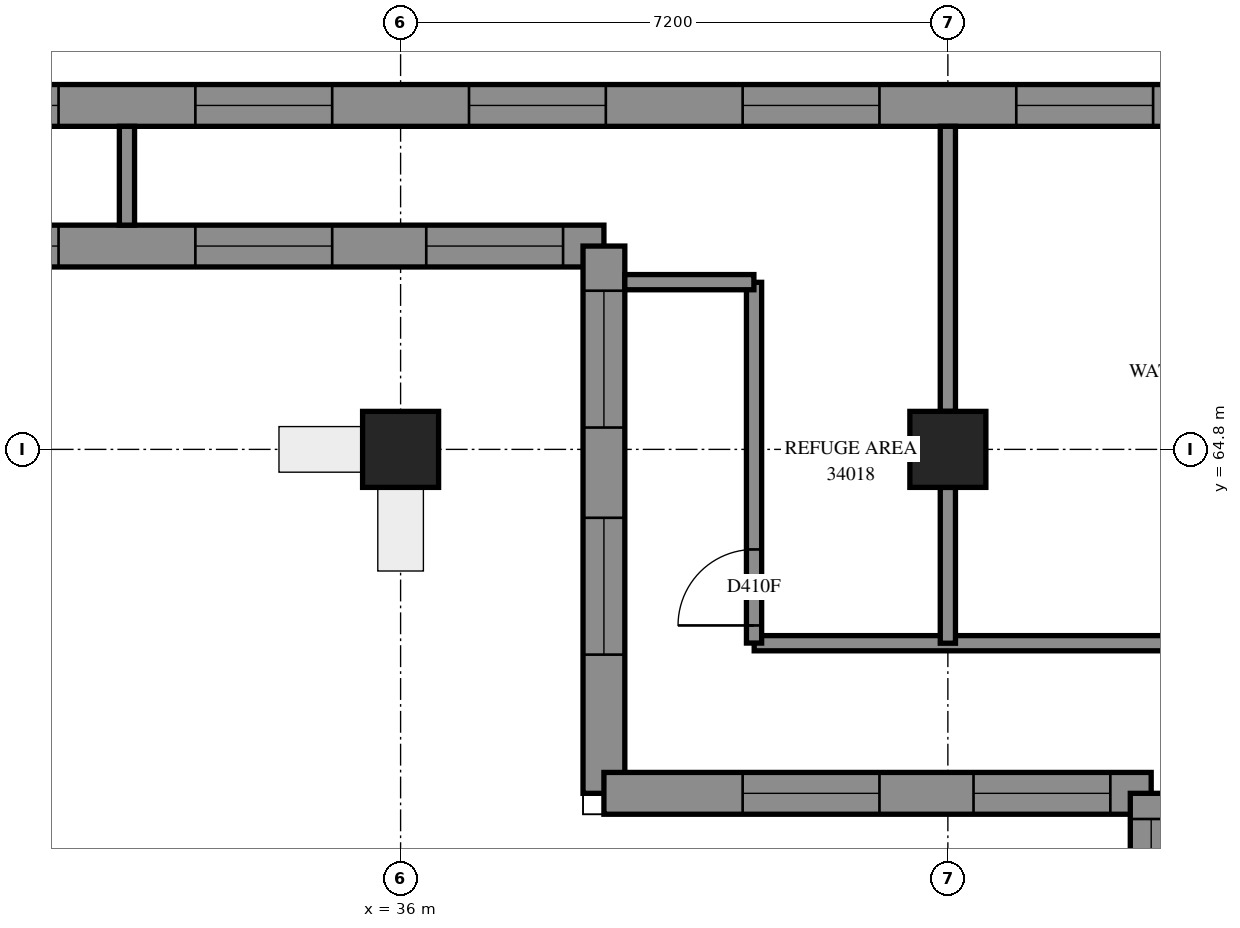
"""IFC4 building model, lengths in metres.
Left out: names, types, materials, properties, quantities, classifications, styles, units other than length and angle.
Written with IfcOpenShell. Run it as: python <this file> out.ifc"""

import sys

from ifc_helpers import new_model, si_unit, direction, frame, frame_2d, origin, origin_2d, place, context, subcontext, project, spatial, polyline, rectangle, outline, extrude, element, fill, save


model = new_model("IFC4")
c1 = context("Model", 3, precision=1e-05, world=origin(), true_north=direction((0.0, 1.0)))
c2 = subcontext(c1, "Body", "Model", "MODEL_VIEW")
j1 = project(units=[si_unit("LENGTHUNIT", "METRE"), si_unit("PLANEANGLEUNIT", "RADIAN")], contexts=[c1])
p1 = place(None, origin())
s1 = spatial("IfcSite", under=j1, at=p1, CompositionType="ELEMENT")
p2 = place(p1, origin())
s2 = spatial("IfcBuilding", under=s1, at=p2, CompositionType="ELEMENT")
p3 = place(p2, frame((0.0, 0.0, 126.2)))
s3 = spatial("IfcBuildingStorey", under=s2, at=p3, CompositionType="ELEMENT", Elevation=126.2)
p4 = place(p3, frame((36.0, 64.8, -0.3), z_axis=(0.0, 0.0, 1.0), x_axis=(1.0, 0.0, 0.0)))
e1 = element("IfcColumn", 1, at=p4, inside=s3, PredefinedType="COLUMN", context=c2, shape_type="SweptSolid", body=[
    extrude(rectangle(XDim=1.0, YDim=1.0, at=origin_2d()), origin(), (0.0, 0.0, 1.0), 5.0),
])
p5 = place(p3, frame((43.2, 64.8, 0.0), z_axis=(0.0, 0.0, 1.0), x_axis=(1.0, 0.0, 0.0)))
e2 = element("IfcColumn", 2, at=p5, inside=s3, PredefinedType="COLUMN", context=c2, shape_type="SweptSolid", body=[
    extrude(rectangle(XDim=1.0, YDim=1.0, at=origin_2d()), origin(), (0.0, 0.0, 1.0), 4.7),
])
p6 = place(p3, frame((78.092, 69.325, 0.0), z_axis=(0.0, 0.0, 1.0), x_axis=(-1.0, 0.0, 0.0)))
e3 = element("IfcWall", 3, at=p6, inside=s3, PredefinedType="SOLIDWALL", context=c2, shape_type="SweptSolid", body=[
    extrude(outline(polyline([(-0.114, -0.275), (54.092, -0.275), (53.542, 0.275), (0.114, 0.275), (-0.114, -0.275)])), origin(), (0.0, 0.0, 1.0), 4.7),
])
p7 = place(p6, frame((0.503, 0.0, 0.9)))
e4 = element("IfcOpeningElement", 4, at=p7, cuts=e3, PredefinedType="OPENING", context=c2, shape_type="SweptSolid", body=[
    extrude(rectangle(XDim=1.8, YDim=2.4, at=frame_2d((0.9, 1.2))), frame((0.0, 0.285, 0.0), z_axis=(0.0, -1.0, 0.0), x_axis=(1.0, 0.0, 0.0)), (0.0, 0.0, 1.0), 0.57),
])
p8 = place(p6, frame((3.392, 0.0, 0.9)))
e5 = element("IfcOpeningElement", 5, at=p8, cuts=e3, PredefinedType="OPENING", context=c2, shape_type="SweptSolid", body=[
    extrude(rectangle(XDim=1.8, YDim=2.4, at=frame_2d((0.9, 1.2))), frame((0.0, 0.285, 0.0), z_axis=(0.0, -1.0, 0.0), x_axis=(1.0, 0.0, 0.0)), (0.0, 0.0, 1.0), 0.57),
])
p9 = place(p6, frame((6.992, 0.0, 0.9)))
e6 = element("IfcOpeningElement", 6, at=p9, cuts=e3, PredefinedType="OPENING", context=c2, shape_type="SweptSolid", body=[
    extrude(rectangle(XDim=1.8, YDim=2.4, at=frame_2d((0.9, 1.2))), frame((0.0, 0.285, 0.0), z_axis=(0.0, -1.0, 0.0), x_axis=(1.0, 0.0, 0.0)), (0.0, 0.0, 1.0), 0.57),
])
p10 = place(p6, frame((10.592, 0.0, 0.9)))
e7 = element("IfcOpeningElement", 7, at=p10, cuts=e3, PredefinedType="OPENING", context=c2, shape_type="SweptSolid", body=[
    extrude(rectangle(XDim=1.8, YDim=2.4, at=frame_2d((0.9, 1.2))), frame((0.0, 0.285, 0.0), z_axis=(0.0, -1.0, 0.0), x_axis=(1.0, 0.0, 0.0)), (0.0, 0.0, 1.0), 0.57),
])
p11 = place(p6, frame((14.192, 0.0, 0.9)))
e8 = element("IfcOpeningElement", 8, at=p11, cuts=e3, PredefinedType="OPENING", context=c2, shape_type="SweptSolid", body=[
    extrude(rectangle(XDim=1.8, YDim=2.4, at=frame_2d((0.9, 1.2))), frame((0.0, 0.285, 0.0), z_axis=(0.0, -1.0, 0.0), x_axis=(1.0, 0.0, 0.0)), (0.0, 0.0, 1.0), 0.57),
])
p12 = place(p6, frame((17.792, 0.0, 0.9)))
e9 = element("IfcOpeningElement", 9, at=p12, cuts=e3, PredefinedType="OPENING", context=c2, shape_type="SweptSolid", body=[
    extrude(rectangle(XDim=1.8, YDim=2.4, at=frame_2d((0.9, 1.2))), frame((0.0, 0.285, 0.0), z_axis=(0.0, -1.0, 0.0), x_axis=(1.0, 0.0, 0.0)), (0.0, 0.0, 1.0), 0.57),
])
p13 = place(p6, frame((21.392, 0.0, 0.9)))
e10 = element("IfcOpeningElement", 10, at=p13, cuts=e3, PredefinedType="OPENING", context=c2, shape_type="SweptSolid", body=[
    extrude(rectangle(XDim=1.8, YDim=2.4, at=frame_2d((0.9, 1.2))), frame((0.0, 0.285, 0.0), z_axis=(0.0, -1.0, 0.0), x_axis=(1.0, 0.0, 0.0)), (0.0, 0.0, 1.0), 0.57),
])
p14 = place(p6, frame((24.992, 0.0, 0.9)))
e11 = element("IfcOpeningElement", 11, at=p14, cuts=e3, PredefinedType="OPENING", context=c2, shape_type="SweptSolid", body=[
    extrude(rectangle(XDim=1.8, YDim=2.4, at=frame_2d((0.9, 1.2))), frame((0.0, 0.285, 0.0), z_axis=(0.0, -1.0, 0.0), x_axis=(1.0, 0.0, 0.0)), (0.0, 0.0, 1.0), 0.57),
])
p15 = place(p6, frame((28.592, 0.0, 0.9)))
e12 = element("IfcOpeningElement", 12, at=p15, cuts=e3, PredefinedType="OPENING", context=c2, shape_type="SweptSolid", body=[
    extrude(rectangle(XDim=1.8, YDim=2.4, at=frame_2d((0.9, 1.2))), frame((0.0, 0.285, 0.0), z_axis=(0.0, -1.0, 0.0), x_axis=(1.0, 0.0, 0.0)), (0.0, 0.0, 1.0), 0.57),
])
p16 = place(p6, frame((32.192, 0.0, 0.9)))
e13 = element("IfcOpeningElement", 13, at=p16, cuts=e3, PredefinedType="OPENING", context=c2, shape_type="SweptSolid", body=[
    extrude(rectangle(XDim=1.8, YDim=2.4, at=frame_2d((0.9, 1.2))), frame((0.0, 0.285, 0.0), z_axis=(0.0, -1.0, 0.0), x_axis=(1.0, 0.0, 0.0)), (0.0, 0.0, 1.0), 0.57),
])
p17 = place(p6, frame((35.792, 0.0, 0.9)))
e14 = element("IfcOpeningElement", 14, at=p17, cuts=e3, PredefinedType="OPENING", context=c2, shape_type="SweptSolid", body=[
    extrude(rectangle(XDim=1.8, YDim=2.4, at=frame_2d((0.9, 1.2))), frame((0.0, 0.285, 0.0), z_axis=(0.0, -1.0, 0.0), x_axis=(1.0, 0.0, 0.0)), (0.0, 0.0, 1.0), 0.57),
])
p18 = place(p6, frame((39.392, 0.0, 0.9)))
e15 = element("IfcOpeningElement", 15, at=p18, cuts=e3, PredefinedType="OPENING", context=c2, shape_type="SweptSolid", body=[
    extrude(rectangle(XDim=1.8, YDim=2.4, at=frame_2d((0.9, 1.2))), frame((0.0, 0.285, 0.0), z_axis=(0.0, -1.0, 0.0), x_axis=(1.0, 0.0, 0.0)), (0.0, 0.0, 1.0), 0.57),
])
p19 = place(p6, frame((42.992, 0.0, 0.9)))
e16 = element("IfcOpeningElement", 16, at=p19, cuts=e3, PredefinedType="OPENING", context=c2, shape_type="SweptSolid", body=[
    extrude(rectangle(XDim=1.8, YDim=2.4, at=frame_2d((0.9, 1.2))), frame((0.0, 0.285, 0.0), z_axis=(0.0, -1.0, 0.0), x_axis=(1.0, 0.0, 0.0)), (0.0, 0.0, 1.0), 0.57),
])
p20 = place(p6, frame((46.592, 0.0, 0.9)))
e17 = element("IfcOpeningElement", 17, at=p20, cuts=e3, PredefinedType="OPENING", context=c2, shape_type="SweptSolid", body=[
    extrude(rectangle(XDim=1.8, YDim=2.4, at=frame_2d((0.9, 1.2))), frame((0.0, 0.285, 0.0), z_axis=(0.0, -1.0, 0.0), x_axis=(1.0, 0.0, 0.0)), (0.0, 0.0, 1.0), 0.57),
])
p21 = place(p6, frame((50.192, 0.0, 0.9)))
e18 = element("IfcOpeningElement", 18, at=p21, cuts=e3, PredefinedType="OPENING", context=c2, shape_type="SweptSolid", body=[
    extrude(rectangle(XDim=1.8, YDim=2.4, at=frame_2d((0.9, 1.2))), frame((0.0, 0.285, 0.0), z_axis=(0.0, -1.0, 0.0), x_axis=(1.0, 0.0, 0.0)), (0.0, 0.0, 1.0), 0.57),
])
p22 = place(p3, frame((24.275, 67.475, 0.0), z_axis=(0.0, 0.0, 1.0), x_axis=(1.0, 0.0, 0.0)))
e19 = element("IfcWall", 19, at=p22, inside=s3, PredefinedType="SOLIDWALL", context=c2, shape_type="SweptSolid", body=[
    extrude(outline(polyline([(-0.275, -0.275), (14.125, -0.275), (14.675, 0.275), (0.275, 0.275), (-0.275, -0.275)])), origin(), (0.0, 0.0, 1.0), 4.7),
])
p23 = place(p22, frame((1.825, 0.0, 0.9)))
e20 = element("IfcOpeningElement", 20, at=p23, cuts=e19, PredefinedType="OPENING", context=c2, shape_type="SweptSolid", body=[
    extrude(rectangle(XDim=1.8, YDim=2.4, at=frame_2d((0.9, 1.2))), frame((0.0, 0.285, 0.0), z_axis=(0.0, -1.0, 0.0), x_axis=(1.0, 0.0, 0.0)), (0.0, 0.0, 1.0), 0.57),
])
p24 = place(p22, frame((5.425, 0.0, 0.9)))
e21 = element("IfcOpeningElement", 21, at=p24, cuts=e19, PredefinedType="OPENING", context=c2, shape_type="SweptSolid", body=[
    extrude(rectangle(XDim=1.8, YDim=2.4, at=frame_2d((0.9, 1.2))), frame((0.0, 0.285, 0.0), z_axis=(0.0, -1.0, 0.0), x_axis=(1.0, 0.0, 0.0)), (0.0, 0.0, 1.0), 0.57),
])
p25 = place(p22, frame((9.025, 0.0, 0.9)))
e22 = element("IfcOpeningElement", 22, at=p25, cuts=e19, PredefinedType="OPENING", context=c2, shape_type="SweptSolid", body=[
    extrude(rectangle(XDim=1.8, YDim=2.4, at=frame_2d((0.9, 1.2))), frame((0.0, 0.285, 0.0), z_axis=(0.0, -1.0, 0.0), x_axis=(1.0, 0.0, 0.0)), (0.0, 0.0, 1.0), 0.57),
])
p26 = place(p22, frame((12.062, 0.0, 0.9)))
e23 = element("IfcOpeningElement", 23, at=p26, cuts=e19, PredefinedType="OPENING", context=c2, shape_type="SweptSolid", body=[
    extrude(rectangle(XDim=1.8, YDim=2.4, at=frame_2d((0.9, 1.2))), frame((0.0, 0.285, 0.0), z_axis=(0.0, -1.0, 0.0), x_axis=(1.0, 0.0, 0.0)), (0.0, 0.0, 1.0), 0.57),
])
p27 = place(p3, frame((38.675, 67.475, 0.0), z_axis=(0.0, 0.0, 1.0), x_axis=(0.0, -1.0, 0.0)))
e24 = element("IfcWall", 24, at=p27, inside=s3, PredefinedType="SOLIDWALL", context=c2, shape_type="SweptSolid", body=[
    extrude(outline(polyline([(0.275, -0.275), (7.475, -0.275), (6.925, 0.275), (-0.275, 0.275), (0.275, -0.275)])), origin(), (0.0, 0.0, 1.0), 4.7),
])
p28 = place(p27, frame((0.588, 0.0, 0.9)))
e25 = element("IfcOpeningElement", 25, at=p28, cuts=e24, PredefinedType="OPENING", context=c2, shape_type="SweptSolid", body=[
    extrude(rectangle(XDim=1.8, YDim=2.4, at=frame_2d((0.9, 1.2))), frame((0.0, 0.285, 0.0), z_axis=(0.0, -1.0, 0.0), x_axis=(1.0, 0.0, 0.0)), (0.0, 0.0, 1.0), 0.57),
])
p29 = place(p27, frame((3.575, 0.0, 0.9)))
e26 = element("IfcOpeningElement", 26, at=p29, cuts=e24, PredefinedType="OPENING", context=c2, shape_type="SweptSolid", body=[
    extrude(rectangle(XDim=1.8, YDim=2.4, at=frame_2d((0.9, 1.2))), frame((0.0, 0.285, 0.0), z_axis=(0.0, -1.0, 0.0), x_axis=(1.0, 0.0, 0.0)), (0.0, 0.0, 1.0), 0.57),
])
p30 = place(p3, frame((38.675, 60.275, 0.0), z_axis=(0.0, 0.0, 1.0), x_axis=(1.0, 0.0, 0.0)))
e27 = element("IfcWall", 27, at=p30, inside=s3, PredefinedType="SOLIDWALL", context=c2, shape_type="SweptSolid", body=[
    extrude(outline(polyline([(-0.275, -0.275), (6.925, -0.275), (7.475, 0.275), (0.275, 0.275), (-0.275, -0.275)])), origin(), (0.0, 0.0, 1.0), 4.7),
])
p31 = place(p30, frame((1.825, 0.0, 0.9)))
e28 = element("IfcOpeningElement", 28, at=p31, cuts=e27, PredefinedType="OPENING", context=c2, shape_type="SweptSolid", body=[
    extrude(rectangle(XDim=1.8, YDim=2.4, at=frame_2d((0.9, 1.2))), frame((0.0, 0.285, 0.0), z_axis=(0.0, -1.0, 0.0), x_axis=(1.0, 0.0, 0.0)), (0.0, 0.0, 1.0), 0.57),
])
p32 = place(p30, frame((4.862, 0.0, 0.9)))
e29 = element("IfcOpeningElement", 29, at=p32, cuts=e27, PredefinedType="OPENING", context=c2, shape_type="SweptSolid", body=[
    extrude(rectangle(XDim=1.8, YDim=2.4, at=frame_2d((0.9, 1.2))), frame((0.0, 0.285, 0.0), z_axis=(0.0, -1.0, 0.0), x_axis=(1.0, 0.0, 0.0)), (0.0, 0.0, 1.0), 0.57),
])
p33 = place(p3, frame((45.875, 60.275, 0.0), z_axis=(0.0, 0.0, 1.0), x_axis=(0.0, -1.0, 0.0)))
e30 = element("IfcWall", 30, at=p33, inside=s3, PredefinedType="SOLIDWALL", context=c2, shape_type="SweptSolid", body=[
    extrude(outline(polyline([(0.275, -0.275), (7.475, -0.275), (6.925, 0.275), (-0.275, 0.275), (0.275, -0.275)])), origin(), (0.0, 0.0, 1.0), 4.7),
])
p34 = place(p33, frame((0.338, 0.0, 0.9)))
e31 = element("IfcOpeningElement", 31, at=p34, cuts=e30, PredefinedType="OPENING", context=c2, shape_type="SweptSolid", body=[
    extrude(rectangle(XDim=1.8, YDim=2.4, at=frame_2d((0.9, 1.2))), frame((0.0, 0.285, 0.0), z_axis=(0.0, -1.0, 0.0), x_axis=(1.0, 0.0, 0.0)), (0.0, 0.0, 1.0), 0.57),
])
p35 = place(p33, frame((3.575, 0.0, 0.9)))
e32 = element("IfcOpeningElement", 32, at=p35, cuts=e30, PredefinedType="OPENING", context=c2, shape_type="SweptSolid", body=[
    extrude(rectangle(XDim=1.8, YDim=2.4, at=frame_2d((0.9, 1.2))), frame((0.0, 0.285, 0.0), z_axis=(0.0, -1.0, 0.0), x_axis=(1.0, 0.0, 0.0)), (0.0, 0.0, 1.0), 0.57),
])
p36 = place(p3, frame((40.652, 62.25, 0.0), z_axis=(0.0, 0.0, 1.0), x_axis=(1.0, 0.0, 0.0)))
e33 = element("IfcWall", 33, at=p36, inside=s3, PredefinedType="PARTITIONING", context=c2, shape_type="SweptSolid", body=[
    extrude(rectangle(XDim=14.148, YDim=0.2, at=frame_2d((7.074, 0.0))), origin(), (0.0, 0.0, 1.0), 4.7),
])
p37 = place(p36, frame((6.41, 0.0, 0.0)))
e34 = element("IfcOpeningElement", 34, at=p37, cuts=e33, PredefinedType="OPENING", context=c2, shape_type="SweptSolid", body=[
    extrude(rectangle(XDim=1.0, YDim=2.1, at=frame_2d((0.5, 1.05))), frame((0.0, 0.11, 0.0), z_axis=(0.0, -1.0, 0.0), x_axis=(1.0, 0.0, 0.0)), (0.0, 0.0, 1.0), 0.22),
])
p38 = place(p36, frame((11.841, 0.0, 0.0)))
e35 = element("IfcOpeningElement", 35, at=p38, cuts=e33, PredefinedType="OPENING", context=c2, shape_type="SweptSolid", body=[
    extrude(rectangle(XDim=1.0, YDim=2.1, at=frame_2d((0.5, 1.05))), frame((0.0, 0.11, 0.0), z_axis=(0.0, -1.0, 0.0), x_axis=(1.0, 0.0, 0.0)), (0.0, 0.0, 1.0), 0.22),
])
p39 = place(p3, frame((40.65, 62.252, 0.0), z_axis=(0.0, 0.0, 1.0), x_axis=(0.0, 1.0, 0.0)))
e36 = element("IfcWall", 36, at=p39, inside=s3, PredefinedType="PARTITIONING", context=c2, shape_type="SweptSolid", body=[
    extrude(rectangle(XDim=4.746, YDim=0.2, at=frame_2d((2.373, 0.0))), origin(), (0.0, 0.0, 1.0), 4.7),
])
p40 = place(p39, frame((0.232, 0.0, 0.0)))
e37 = element("IfcOpeningElement", 37, at=p40, cuts=e36, PredefinedType="OPENING", context=c2, shape_type="SweptSolid", body=[
    extrude(rectangle(XDim=1.0, YDim=2.1, at=frame_2d((0.5, 1.05))), frame((0.0, 0.11, 0.0), z_axis=(0.0, -1.0, 0.0), x_axis=(1.0, 0.0, 0.0)), (0.0, 0.0, 1.0), 0.22),
])
p41 = place(p3, frame((43.2, 65.3, 0.0), z_axis=(0.0, 0.0, 1.0), x_axis=(0.0, 1.0, 0.0)))
e38 = element("IfcWall", 38, at=p41, inside=s3, PredefinedType="PARTITIONING", context=c2, shape_type="SweptSolid", body=[
    extrude(rectangle(XDim=3.75, YDim=0.2, at=frame_2d((1.875, 0.0))), origin(), (0.0, 0.0, 1.0), 4.7),
])
p42 = place(p3, frame((43.2, 62.25, 0.0), z_axis=(0.0, 0.0, 1.0), x_axis=(0.0, 1.0, 0.0)))
e39 = element("IfcWall", 39, at=p42, inside=s3, PredefinedType="PARTITIONING", context=c2, shape_type="SweptSolid", body=[
    extrude(rectangle(XDim=2.05, YDim=0.2, at=frame_2d((1.025, 0.0))), origin(), (0.0, 0.0, 1.0), 4.7),
])
p43 = place(p3, frame((38.95, 67.0, 0.0), z_axis=(0.0, 0.0, 1.0), x_axis=(1.0, 0.0, 0.0)))
e40 = element("IfcWall", 40, at=p43, inside=s3, PredefinedType="PARTITIONING", context=c2, shape_type="SweptSolid", body=[
    extrude(rectangle(XDim=1.698, YDim=0.2, at=frame_2d((0.849, 0.0))), origin(), (0.0, 0.0, 1.0), 4.7),
])
p44 = place(p3, frame((32.4, 67.75, 0.0), z_axis=(0.0, 0.0, 1.0), x_axis=(0.0, 1.0, 0.0)))
e41 = element("IfcWall", 41, at=p44, inside=s3, PredefinedType="PARTITIONING", context=c2, shape_type="SweptSolid", body=[
    extrude(rectangle(XDim=1.3, YDim=0.2, at=frame_2d((0.65, 0.0))), origin(), (0.0, 0.0, 1.0), 4.7),
])
p45 = place(p16, origin())
e42 = element("IfcWindow", 42, at=p45, inside=s3, PartitioningType="SINGLE_PANEL", PredefinedType="WINDOW", context=c2, shape_type="SweptSolid", body=[
    extrude(rectangle(XDim=1.8, YDim=2.4, at=frame_2d((0.9, 1.2))), frame((0.0, 0.155, 0.0), z_axis=(0.0, -1.0, 0.0), x_axis=(1.0, 0.0, 0.0)), (0.0, 0.0, 1.0), 0.06),
])
fill(e13, e42)
p46 = place(p17, origin())
e43 = element("IfcWindow", 43, at=p46, inside=s3, PartitioningType="SINGLE_PANEL", PredefinedType="WINDOW", context=c2, shape_type="SweptSolid", body=[
    extrude(rectangle(XDim=1.8, YDim=2.4, at=frame_2d((0.9, 1.2))), frame((0.0, 0.155, 0.0), z_axis=(0.0, -1.0, 0.0), x_axis=(1.0, 0.0, 0.0)), (0.0, 0.0, 1.0), 0.06),
])
fill(e14, e43)
p47 = place(p18, origin())
e44 = element("IfcWindow", 44, at=p47, inside=s3, PartitioningType="SINGLE_PANEL", PredefinedType="WINDOW", context=c2, shape_type="SweptSolid", body=[
    extrude(rectangle(XDim=1.8, YDim=2.4, at=frame_2d((0.9, 1.2))), frame((0.0, 0.155, 0.0), z_axis=(0.0, -1.0, 0.0), x_axis=(1.0, 0.0, 0.0)), (0.0, 0.0, 1.0), 0.06),
])
fill(e15, e44)
p48 = place(p19, origin())
e45 = element("IfcWindow", 45, at=p48, inside=s3, PartitioningType="SINGLE_PANEL", PredefinedType="WINDOW", context=c2, shape_type="SweptSolid", body=[
    extrude(rectangle(XDim=1.8, YDim=2.4, at=frame_2d((0.9, 1.2))), frame((0.0, 0.155, 0.0), z_axis=(0.0, -1.0, 0.0), x_axis=(1.0, 0.0, 0.0)), (0.0, 0.0, 1.0), 0.06),
])
fill(e16, e45)
p49 = place(p20, origin())
e46 = element("IfcWindow", 46, at=p49, inside=s3, PartitioningType="SINGLE_PANEL", PredefinedType="WINDOW", context=c2, shape_type="SweptSolid", body=[
    extrude(rectangle(XDim=1.8, YDim=2.4, at=frame_2d((0.9, 1.2))), frame((0.0, 0.155, 0.0), z_axis=(0.0, -1.0, 0.0), x_axis=(1.0, 0.0, 0.0)), (0.0, 0.0, 1.0), 0.06),
])
fill(e17, e46)
p50 = place(p24, origin())
e47 = element("IfcWindow", 47, at=p50, inside=s3, PartitioningType="SINGLE_PANEL", PredefinedType="WINDOW", context=c2, shape_type="SweptSolid", body=[
    extrude(rectangle(XDim=1.8, YDim=2.4, at=frame_2d((0.9, 1.2))), frame((0.0, 0.155, 0.0), z_axis=(0.0, -1.0, 0.0), x_axis=(1.0, 0.0, 0.0)), (0.0, 0.0, 1.0), 0.06),
])
fill(e21, e47)
p51 = place(p25, origin())
e48 = element("IfcWindow", 48, at=p51, inside=s3, PartitioningType="SINGLE_PANEL", PredefinedType="WINDOW", context=c2, shape_type="SweptSolid", body=[
    extrude(rectangle(XDim=1.8, YDim=2.4, at=frame_2d((0.9, 1.2))), frame((0.0, 0.155, 0.0), z_axis=(0.0, -1.0, 0.0), x_axis=(1.0, 0.0, 0.0)), (0.0, 0.0, 1.0), 0.06),
])
fill(e22, e48)
p52 = place(p26, origin())
e49 = element("IfcWindow", 49, at=p52, inside=s3, PartitioningType="SINGLE_PANEL", PredefinedType="WINDOW", context=c2, shape_type="SweptSolid", body=[
    extrude(rectangle(XDim=1.8, YDim=2.4, at=frame_2d((0.9, 1.2))), frame((0.0, 0.155, 0.0), z_axis=(0.0, -1.0, 0.0), x_axis=(1.0, 0.0, 0.0)), (0.0, 0.0, 1.0), 0.06),
])
fill(e23, e49)
p53 = place(p28, origin())
e50 = element("IfcWindow", 50, at=p53, inside=s3, PartitioningType="SINGLE_PANEL", PredefinedType="WINDOW", context=c2, shape_type="SweptSolid", body=[
    extrude(rectangle(XDim=1.8, YDim=2.4, at=frame_2d((0.9, 1.2))), frame((0.0, 0.155, 0.0), z_axis=(0.0, -1.0, 0.0), x_axis=(1.0, 0.0, 0.0)), (0.0, 0.0, 1.0), 0.06),
])
fill(e25, e50)
p54 = place(p29, origin())
e51 = element("IfcWindow", 51, at=p54, inside=s3, PartitioningType="SINGLE_PANEL", PredefinedType="WINDOW", context=c2, shape_type="SweptSolid", body=[
    extrude(rectangle(XDim=1.8, YDim=2.4, at=frame_2d((0.9, 1.2))), frame((0.0, 0.155, 0.0), z_axis=(0.0, -1.0, 0.0), x_axis=(1.0, 0.0, 0.0)), (0.0, 0.0, 1.0), 0.06),
])
fill(e26, e51)
p55 = place(p31, origin())
e52 = element("IfcWindow", 52, at=p55, inside=s3, PartitioningType="SINGLE_PANEL", PredefinedType="WINDOW", context=c2, shape_type="SweptSolid", body=[
    extrude(rectangle(XDim=1.8, YDim=2.4, at=frame_2d((0.9, 1.2))), frame((0.0, 0.155, 0.0), z_axis=(0.0, -1.0, 0.0), x_axis=(1.0, 0.0, 0.0)), (0.0, 0.0, 1.0), 0.06),
])
fill(e28, e52)
p56 = place(p32, origin())
e53 = element("IfcWindow", 53, at=p56, inside=s3, PartitioningType="SINGLE_PANEL", PredefinedType="WINDOW", context=c2, shape_type="SweptSolid", body=[
    extrude(rectangle(XDim=1.8, YDim=2.4, at=frame_2d((0.9, 1.2))), frame((0.0, 0.155, 0.0), z_axis=(0.0, -1.0, 0.0), x_axis=(1.0, 0.0, 0.0)), (0.0, 0.0, 1.0), 0.06),
])
fill(e29, e53)
p57 = place(p34, origin())
e54 = element("IfcWindow", 54, at=p57, inside=s3, PartitioningType="SINGLE_PANEL", PredefinedType="WINDOW", context=c2, shape_type="SweptSolid", body=[
    extrude(rectangle(XDim=1.8, YDim=2.4, at=frame_2d((0.9, 1.2))), frame((0.0, 0.155, 0.0), z_axis=(0.0, -1.0, 0.0), x_axis=(1.0, 0.0, 0.0)), (0.0, 0.0, 1.0), 0.06),
])
fill(e31, e54)
p58 = place(p40, origin())
e55 = element("IfcDoor", 55, at=p58, inside=s3, OperationType="SINGLE_SWING_LEFT", PredefinedType="DOOR", context=c2, shape_type="SweptSolid", body=[
    extrude(rectangle(XDim=1.0, YDim=2.1, at=frame_2d((0.5, 1.05))), frame((0.0, 0.025, 0.0), z_axis=(0.0, -1.0, 0.0), x_axis=(1.0, 0.0, 0.0)), (0.0, 0.0, 1.0), 0.05),
])
fill(e37, e55)
save(model, sys.argv[1])
